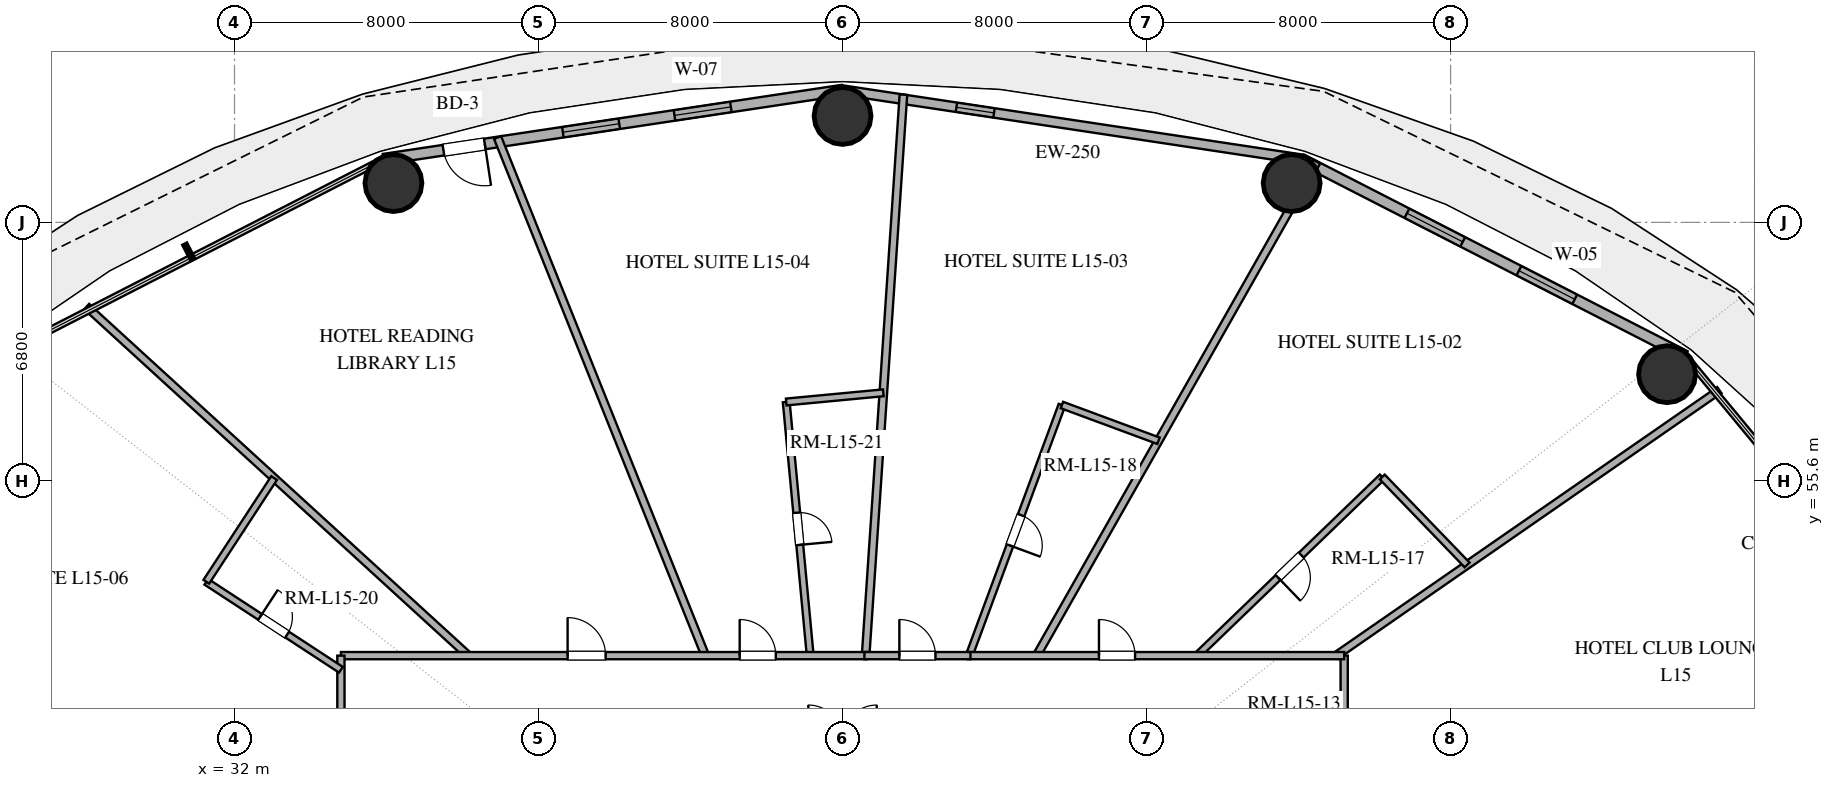
"""IFC4 building model, lengths in metres.
Left out: names, types, materials, properties, quantities, classifications, styles, units other than length and angle.
Written with IfcOpenShell. Run it as: python <this file> out.ifc"""

import sys

from ifc_helpers import new_model, si_unit, direction, frame, frame_2d, origin, origin_2d, place, context, subcontext, project, spatial, rectangle, hollow_circle, extrude, element, fill, save


model = new_model("IFC4")
c1 = context("Model", 3, precision=1e-05, world=origin(), true_north=direction((0.0, 1.0)))
c2 = subcontext(c1, "Body", "Model", "MODEL_VIEW")
j1 = project(units=[si_unit("LENGTHUNIT", "METRE"), si_unit("PLANEANGLEUNIT", "RADIAN")], contexts=[c1])
p1 = place(None, origin())
s1 = spatial("IfcSite", under=j1, at=p1, CompositionType="ELEMENT")
p2 = place(p1, origin())
s2 = spatial("IfcBuilding", under=s1, at=p2, CompositionType="ELEMENT")
p3 = place(p2, frame((0.0, 0.0, 64.2)))
s3 = spatial("IfcBuildingStorey", under=s2, at=p3, CompositionType="ELEMENT", Elevation=64.2)
for number, where, z_axis, x_axis in (
    (1, (69.697, 58.405, 0.0), (0.0, 0.0, 1.0), (1.0, 0.0, 0.0)),
    (2, (59.818, 63.434, 0.0), (0.0, 0.0, 1.0), (1.0, 0.0, 0.0)),
    (3, (48.0, 65.2, 0.0), (0.0, 0.0, 1.0), (1.0, 0.0, 0.0)),
    (4, (36.182, 63.434, 0.0), (0.0, 0.0, 1.0), (1.0, 0.0, 0.0)),
):
    element("IfcColumn", number, at=place(p3, frame(where, z_axis=z_axis, x_axis=x_axis)), inside=s3, PredefinedType="COLUMN", context=c2, shape_type="SweptSolid", body=[
        extrude(hollow_circle(Radius=0.75, WallThickness=0.04, at=origin_2d()), origin(), (0.0, 0.0, 1.0), 3.38),
    ])
p4 = place(p3, frame((70.174, 58.886, 0.0), z_axis=(0.0, 0.0, 1.0), x_axis=(-0.889853976658, 0.456245438581, 0.0)))
e5 = element("IfcWall", 5, at=p4, inside=s3, PredefinedType="SOLIDWALL", context=c2, shape_type="SweptSolid", body=[
    extrude(rectangle(XDim=11.346, YDim=0.28, at=frame_2d((5.673, 0.0))), origin(), (0.0, 0.0, 1.0), 3.38),
])
p5 = place(p4, frame((3.267, 0.0, 0.85)))
e6 = element("IfcOpeningElement", 6, at=p5, cuts=e5, PredefinedType="OPENING", context=c2, shape_type="SweptSolid", body=[
    extrude(rectangle(XDim=1.65, YDim=2.0, at=frame_2d((0.825, 1.0))), frame((0.0, 0.15, 0.0), z_axis=(0.0, -1.0, 0.0), x_axis=(1.0, 0.0, 0.0)), (0.0, 0.0, 1.0), 0.3),
])
p6 = place(p4, frame((6.579, 0.0, 0.85)))
e7 = element("IfcOpeningElement", 7, at=p6, cuts=e5, PredefinedType="OPENING", context=c2, shape_type="SweptSolid", body=[
    extrude(rectangle(XDim=1.65, YDim=2.0, at=frame_2d((0.825, 1.0))), frame((0.0, 0.15, 0.0), z_axis=(0.0, -1.0, 0.0), x_axis=(1.0, 0.0, 0.0)), (0.0, 0.0, 1.0), 0.3),
])
p7 = place(p3, frame((60.078, 64.062, 0.0), z_axis=(0.0, 0.0, 1.0), x_axis=(-0.988864835849, 0.148816452121, 0.0)))
e8 = element("IfcWall", 8, at=p7, inside=s3, PredefinedType="SOLIDWALL", context=c2, shape_type="SweptSolid", body=[
    extrude(rectangle(XDim=12.214, YDim=0.25, at=frame_2d((6.107, 0.0))), origin(), (0.0, 0.0, 1.0), 3.38),
])
p8 = place(p7, frame((8.183, 0.0, 1.42)))
e9 = element("IfcOpeningElement", 9, at=p8, cuts=e8, PredefinedType="OPENING", context=c2, shape_type="SweptSolid", body=[
    extrude(rectangle(XDim=1.0, YDim=1.05, at=frame_2d((0.5, 0.525))), frame((0.0, 0.135, 0.0), z_axis=(0.0, -1.0, 0.0), x_axis=(1.0, 0.0, 0.0)), (0.0, 0.0, 1.0), 0.27),
])
p9 = place(p3, frame((48.0, 65.88, 0.0), z_axis=(0.0, 0.0, 1.0), x_axis=(-0.988864835849, -0.148816452121, 0.0)))
e10 = element("IfcWall", 10, at=p9, inside=s3, PredefinedType="SOLIDWALL", context=c2, shape_type="SweptSolid", body=[
    extrude(rectangle(XDim=12.214, YDim=0.28, at=frame_2d((6.107, 0.0))), origin(), (0.0, 0.0, 1.0), 3.38),
])
p10 = place(p9, frame((2.972, 0.0, 0.85)))
e11 = element("IfcOpeningElement", 11, at=p10, cuts=e10, PredefinedType="OPENING", context=c2, shape_type="SweptSolid", body=[
    extrude(rectangle(XDim=1.5, YDim=1.8, at=frame_2d((0.75, 0.9))), frame((0.0, 0.15, 0.0), z_axis=(0.0, -1.0, 0.0), x_axis=(1.0, 0.0, 0.0)), (0.0, 0.0, 1.0), 0.3),
])
p11 = place(p9, frame((5.942, 0.0, 0.85)))
e12 = element("IfcOpeningElement", 12, at=p11, cuts=e10, PredefinedType="OPENING", context=c2, shape_type="SweptSolid", body=[
    extrude(rectangle(XDim=1.5, YDim=1.8, at=frame_2d((0.75, 0.9))), frame((0.0, 0.15, 0.0), z_axis=(0.0, -1.0, 0.0), x_axis=(1.0, 0.0, 0.0)), (0.0, 0.0, 1.0), 0.3),
])
p12 = place(p9, frame((9.52, 0.0, 0.0)))
e13 = element("IfcOpeningElement", 13, at=p12, cuts=e10, PredefinedType="OPENING", context=c2, shape_type="SweptSolid", body=[
    extrude(rectangle(XDim=1.1, YDim=2.25, at=frame_2d((0.55, 1.125))), frame((0.0, 0.15, 0.0), z_axis=(0.0, -1.0, 0.0), x_axis=(1.0, 0.0, 0.0)), (0.0, 0.0, 1.0), 0.3),
])
p13 = place(p3, frame((44.39, 51.0, 0.0), z_axis=(0.0, 0.0, 1.0), x_axis=(-0.372301847193, 0.928111703717, 0.0)))
e14 = element("IfcWall", 14, at=p13, inside=s3, PredefinedType="PARTITIONING", context=c2, shape_type="SweptSolid", body=[
    extrude(rectangle(XDim=14.688, YDim=0.2, at=frame_2d((7.344, 0.0))), origin(), (0.0, 0.0, 1.0), 2.74),
])
p14 = place(p3, frame((19.184, 50.653, 0.0), z_axis=(0.0, 0.0, 1.0), x_axis=(0.957749889613, -0.287602414708, 0.0)))
e15 = element("IfcWall", 15, at=p14, inside=s3, PredefinedType="PARTITIONING", context=c2, shape_type="SweptSolid", body=[
    extrude(rectangle(XDim=8.8, YDim=0.2, at=frame_2d((4.4, 0.0))), origin(), (0.0, 0.0, 1.0), 2.74),
])
p15 = place(p3, frame((53.107, 51.0, 0.0), z_axis=(0.0, 0.0, 1.0), x_axis=(0.493512300658, 0.869738816599, 0.0)))
e16 = element("IfcWall", 16, at=p15, inside=s3, PredefinedType="PARTITIONING", context=c2, shape_type="SweptSolid", body=[
    extrude(rectangle(XDim=14.938, YDim=0.2, at=frame_2d((7.469, 0.0))), origin(), (0.0, 0.0, 1.0), 2.74),
])
p16 = place(p3, frame((60.991, 51.0, 0.0), z_axis=(0.0, 0.0, 1.0), x_axis=(0.821999402566, 0.569488351226, 0.0)))
e17 = element("IfcWall", 17, at=p16, inside=s3, PredefinedType="PARTITIONING", context=c2, shape_type="SweptSolid", body=[
    extrude(rectangle(XDim=12.266, YDim=0.2, at=frame_2d((6.133, 0.0))), origin(), (0.0, 0.0, 1.0), 2.74),
])
p17 = place(p3, frame((48.607, 51.0, 0.0), z_axis=(0.0, 0.0, 1.0), x_axis=(0.067284649742, 0.997733820169, 0.0)))
e18 = element("IfcWall", 18, at=p17, inside=s3, PredefinedType="PARTITIONING", context=c2, shape_type="SweptSolid", body=[
    extrude(rectangle(XDim=14.793, YDim=0.2, at=frame_2d((7.396, 0.0))), origin(), (0.0, 0.0, 1.0), 2.74),
])
p18 = place(p3, frame((53.773, 57.594, 0.0), z_axis=(0.0, 0.0, 1.0), x_axis=(-0.347170736851, -0.93780194043, 0.0)))
e19 = element("IfcWall", 19, at=p18, inside=s3, PredefinedType="PLUMBINGWALL", context=c2, shape_type="SweptSolid", body=[
    extrude(rectangle(XDim=7.031, YDim=0.18, at=frame_2d((3.516, 0.0))), origin(), (0.0, 0.0, 1.0), 2.74),
])
p19 = place(p18, frame((3.091, 0.0, 0.0)))
e20 = element("IfcOpeningElement", 20, at=p19, cuts=e19, PredefinedType="OPENING", context=c2, shape_type="SweptSolid", body=[
    extrude(rectangle(XDim=0.85, YDim=2.1, at=frame_2d((0.425, 1.05))), frame((0.0, 0.1, 0.0), z_axis=(0.0, -1.0, 0.0), x_axis=(1.0, 0.0, 0.0)), (0.0, 0.0, 1.0), 0.2),
])
p20 = place(p3, frame((38.154, 51.0, 0.0), z_axis=(0.0, 0.0, 1.0), x_axis=(-0.738119160364, 0.674670367738, 0.0)))
e21 = element("IfcWall", 21, at=p20, inside=s3, PredefinedType="PARTITIONING", context=c2, shape_type="SweptSolid", body=[
    extrude(rectangle(XDim=13.61, YDim=0.2, at=frame_2d((6.805, 0.0))), origin(), (0.0, 0.0, 1.0), 2.74),
])
p21 = place(p3, frame((61.2, 51.0, 0.0), z_axis=(0.0, 0.0, 1.0), x_axis=(0.0, -1.0, 0.0)))
e22 = element("IfcWall", 22, at=p21, inside=s3, PredefinedType="PARTITIONING", context=c2, shape_type="SweptSolid", body=[
    extrude(rectangle(XDim=12.964, YDim=0.19, at=frame_2d((6.482, 0.0))), origin(), (0.0, 0.0, 1.0), 2.74),
])
p22 = place(p21, frame((2.971, 0.0, 0.0)))
e23 = element("IfcOpeningElement", 23, at=p22, cuts=e22, PredefinedType="OPENING", context=c2, shape_type="SweptSolid", body=[
    extrude(rectangle(XDim=1.0, YDim=2.2, at=frame_2d((0.5, 1.1))), frame((0.0, 0.105, 0.0), z_axis=(0.0, -1.0, 0.0), x_axis=(1.0, 0.0, 0.0)), (0.0, 0.0, 1.0), 0.21),
])
p23 = place(p21, frame((8.344, 0.0, 0.0)))
e24 = element("IfcOpeningElement", 24, at=p23, cuts=e22, PredefinedType="OPENING", context=c2, shape_type="SweptSolid", body=[
    extrude(rectangle(XDim=0.95, YDim=2.15, at=frame_2d((0.475, 1.075))), frame((0.0, 0.105, 0.0), z_axis=(0.0, -1.0, 0.0), x_axis=(1.0, 0.0, 0.0)), (0.0, 0.0, 1.0), 0.21),
])
p24 = place(p3, frame((62.202, 55.701, 0.0), z_axis=(0.0, 0.0, 1.0), x_axis=(-0.719667322044, -0.69431905172, 0.0)))
e25 = element("IfcWall", 25, at=p24, inside=s3, PredefinedType="PLUMBINGWALL", context=c2, shape_type="SweptSolid", body=[
    extrude(rectangle(XDim=6.771, YDim=0.18, at=frame_2d((3.385, 0.0))), origin(), (0.0, 0.0, 1.0), 2.74),
])
p25 = place(p24, frame((2.96, 0.0, 0.0)))
e26 = element("IfcOpeningElement", 26, at=p25, cuts=e25, PredefinedType="OPENING", context=c2, shape_type="SweptSolid", body=[
    extrude(rectangle(XDim=0.85, YDim=2.1, at=frame_2d((0.425, 1.05))), frame((0.0, 0.1, 0.0), z_axis=(0.0, -1.0, 0.0), x_axis=(1.0, 0.0, 0.0)), (0.0, 0.0, 1.0), 0.2),
])
p26 = place(p3, frame((46.518, 57.674, 0.0), z_axis=(0.0, 0.0, 1.0), x_axis=(0.094107851527, -0.995562008255, 0.0)))
e27 = element("IfcWall", 27, at=p26, inside=s3, PredefinedType="PLUMBINGWALL", context=c2, shape_type="SweptSolid", body=[
    extrude(rectangle(XDim=6.704, YDim=0.18, at=frame_2d((3.352, 0.0))), origin(), (0.0, 0.0, 1.0), 2.74),
])
p27 = place(p26, frame((2.927, 0.0, 0.0)))
e28 = element("IfcOpeningElement", 28, at=p27, cuts=e27, PredefinedType="OPENING", context=c2, shape_type="SweptSolid", body=[
    extrude(rectangle(XDim=0.85, YDim=2.1, at=frame_2d((0.425, 1.05))), frame((0.0, 0.1, 0.0), z_axis=(0.0, -1.0, 0.0), x_axis=(1.0, 0.0, 0.0)), (0.0, 0.0, 1.0), 0.2),
])
p28 = place(p3, frame((34.8, 51.0, 0.0), z_axis=(0.0, 0.0, 1.0), x_axis=(1.0, 0.0, 0.0)))
e29 = element("IfcWall", 29, at=p28, inside=s3, PredefinedType="PARTITIONING", context=c2, shape_type="SweptSolid", body=[
    extrude(rectangle(XDim=13.839, YDim=0.19, at=frame_2d((6.919, 0.0))), origin(), (0.0, 0.0, 1.0), 2.74),
])
p29 = place(p28, frame((5.965, 0.0, 0.0)))
e30 = element("IfcOpeningElement", 30, at=p29, cuts=e29, PredefinedType="OPENING", context=c2, shape_type="SweptSolid", body=[
    extrude(rectangle(XDim=1.0, YDim=2.2, at=frame_2d((0.5, 1.1))), frame((0.0, 0.105, 0.0), z_axis=(0.0, -1.0, 0.0), x_axis=(1.0, 0.0, 0.0)), (0.0, 0.0, 1.0), 0.21),
])
p30 = place(p28, frame((10.493, 0.0, 0.0)))
e31 = element("IfcOpeningElement", 31, at=p30, cuts=e29, PredefinedType="OPENING", context=c2, shape_type="SweptSolid", body=[
    extrude(rectangle(XDim=0.95, YDim=2.15, at=frame_2d((0.475, 1.075))), frame((0.0, 0.105, 0.0), z_axis=(0.0, -1.0, 0.0), x_axis=(1.0, 0.0, 0.0)), (0.0, 0.0, 1.0), 0.21),
])
p31 = place(p3, frame((34.8, 43.728, 0.0), z_axis=(0.0, 0.0, 1.0), x_axis=(0.0, 1.0, 0.0)))
e32 = element("IfcWall", 32, at=p31, inside=s3, PredefinedType="PARTITIONING", context=c2, shape_type="SweptSolid", body=[
    extrude(rectangle(XDim=7.272, YDim=0.19, at=frame_2d((3.636, 0.0))), origin(), (0.0, 0.0, 1.0), 2.74),
])
p32 = place(p31, frame((4.096, 0.0, 0.0)))
e33 = element("IfcOpeningElement", 33, at=p32, cuts=e32, PredefinedType="OPENING", context=c2, shape_type="SweptSolid", body=[
    extrude(rectangle(XDim=0.95, YDim=2.15, at=frame_2d((0.475, 1.075))), frame((0.0, 0.105, 0.0), z_axis=(0.0, -1.0, 0.0), x_axis=(1.0, 0.0, 0.0)), (0.0, 0.0, 1.0), 0.21),
])
p33 = place(p3, frame((51.298, 51.0, 0.0), z_axis=(0.0, 0.0, 1.0), x_axis=(1.0, 0.0, 0.0)))
e34 = element("IfcWall", 34, at=p33, inside=s3, PredefinedType="PARTITIONING", context=c2, shape_type="SweptSolid", body=[
    extrude(rectangle(XDim=9.902, YDim=0.19, at=frame_2d((4.951, 0.0))), origin(), (0.0, 0.0, 1.0), 2.74),
])
p34 = place(p33, frame((3.45, 0.0, 0.0)))
e35 = element("IfcOpeningElement", 35, at=p34, cuts=e34, PredefinedType="OPENING", context=c2, shape_type="SweptSolid", body=[
    extrude(rectangle(XDim=0.95, YDim=2.15, at=frame_2d((0.475, 1.075))), frame((0.0, 0.105, 0.0), z_axis=(0.0, -1.0, 0.0), x_axis=(1.0, 0.0, 0.0)), (0.0, 0.0, 1.0), 0.21),
])
p35 = place(p3, frame((31.258, 52.944, 0.0), z_axis=(0.0, 0.0, 1.0), x_axis=(0.837031612028, -0.5471545307, 0.0)))
e36 = element("IfcWall", 36, at=p35, inside=s3, PredefinedType="PLUMBINGWALL", context=c2, shape_type="SweptSolid", body=[
    extrude(rectangle(XDim=4.231, YDim=0.18, at=frame_2d((2.116, 0.0))), origin(), (0.0, 0.0, 1.0), 2.74),
])
p36 = place(p35, frame((1.691, 0.0, 0.0)))
e37 = element("IfcOpeningElement", 37, at=p36, cuts=e36, PredefinedType="OPENING", context=c2, shape_type="SweptSolid", body=[
    extrude(rectangle(XDim=0.85, YDim=2.1, at=frame_2d((0.425, 1.05))), frame((0.0, 0.1, 0.0), z_axis=(0.0, -1.0, 0.0), x_axis=(1.0, 0.0, 0.0)), (0.0, 0.0, 1.0), 0.2),
])
p37 = place(p3, frame((33.042, 55.672, 0.0), z_axis=(0.0, 0.0, 1.0), x_axis=(-0.547176717469, -0.837017108463, 0.0)))
e38 = element("IfcWall", 38, at=p37, inside=s3, PredefinedType="PLUMBINGWALL", context=c2, shape_type="SweptSolid", body=[
    extrude(rectangle(XDim=3.26, YDim=0.18, at=frame_2d((1.63, 0.0))), origin(), (0.0, 0.0, 1.0), 2.74),
])
p38 = place(p3, frame((64.435, 53.386, 0.0), z_axis=(0.0, 0.0, 1.0), x_axis=(-0.694278833189, 0.719706121821, 0.0)))
e39 = element("IfcWall", 39, at=p38, inside=s3, PredefinedType="PLUMBINGWALL", context=c2, shape_type="SweptSolid", body=[
    extrude(rectangle(XDim=3.217, YDim=0.18, at=frame_2d((1.608, 0.0))), origin(), (0.0, 0.0, 1.0), 2.74),
])
p39 = place(p3, frame((48.575, 51.0, 0.0), z_axis=(0.0, 0.0, 1.0), x_axis=(1.0, 0.0, 0.0)))
e40 = element("IfcWall", 40, at=p39, inside=s3, PredefinedType="PARTITIONING", context=c2, shape_type="SweptSolid", body=[
    extrude(rectangle(XDim=2.791, YDim=0.19, at=frame_2d((1.396, 0.0))), origin(), (0.0, 0.0, 1.0), 2.74),
])
p40 = place(p39, frame((0.921, 0.0, 0.0)))
e41 = element("IfcOpeningElement", 41, at=p40, cuts=e40, PredefinedType="OPENING", context=c2, shape_type="SweptSolid", body=[
    extrude(rectangle(XDim=0.95, YDim=2.15, at=frame_2d((0.475, 1.075))), frame((0.0, 0.105, 0.0), z_axis=(0.0, -1.0, 0.0), x_axis=(1.0, 0.0, 0.0)), (0.0, 0.0, 1.0), 0.21),
])
p41 = place(p3, frame((56.315, 56.653, 0.0), z_axis=(0.0, 0.0, 1.0), x_axis=(-0.937805250992, 0.347161793999, 0.0)))
e42 = element("IfcWall", 42, at=p41, inside=s3, PredefinedType="PLUMBINGWALL", context=c2, shape_type="SweptSolid", body=[
    extrude(rectangle(XDim=2.71, YDim=0.18, at=frame_2d((1.355, 0.0))), origin(), (0.0, 0.0, 1.0), 2.74),
])
p42 = place(p3, frame((49.073, 57.915, 0.0), z_axis=(0.0, 0.0, 1.0), x_axis=(-0.995563205557, -0.09409518447, 0.0)))
e43 = element("IfcWall", 43, at=p42, inside=s3, PredefinedType="PLUMBINGWALL", context=c2, shape_type="SweptSolid", body=[
    extrude(rectangle(XDim=2.566, YDim=0.18, at=frame_2d((1.283, 0.0))), origin(), (0.0, 0.0, 1.0), 2.74),
])
p43 = place(p5, origin())
e44 = element("IfcWindow", 44, at=p43, inside=s3, PartitioningType="SINGLE_PANEL", PredefinedType="WINDOW", context=c2, shape_type="SweptSolid", body=[
    extrude(rectangle(XDim=1.65, YDim=2.0, at=frame_2d((0.825, 1.0))), frame((0.0, 0.03, 0.0), z_axis=(0.0, -1.0, 0.0), x_axis=(1.0, 0.0, 0.0)), (0.0, 0.0, 1.0), 0.06),
])
fill(e6, e44)
p44 = place(p6, origin())
e45 = element("IfcWindow", 45, at=p44, inside=s3, PartitioningType="SINGLE_PANEL", PredefinedType="WINDOW", context=c2, shape_type="SweptSolid", body=[
    extrude(rectangle(XDim=1.65, YDim=2.0, at=frame_2d((0.825, 1.0))), frame((0.0, 0.03, 0.0), z_axis=(0.0, -1.0, 0.0), x_axis=(1.0, 0.0, 0.0)), (0.0, 0.0, 1.0), 0.06),
])
fill(e7, e45)
p45 = place(p10, origin())
e46 = element("IfcWindow", 46, at=p45, inside=s3, PartitioningType="SINGLE_PANEL", PredefinedType="WINDOW", context=c2, shape_type="SweptSolid", body=[
    extrude(rectangle(XDim=1.5, YDim=1.8, at=frame_2d((0.75, 0.9))), frame((0.0, 0.03, 0.0), z_axis=(0.0, -1.0, 0.0), x_axis=(1.0, 0.0, 0.0)), (0.0, 0.0, 1.0), 0.06),
])
fill(e11, e46)
p46 = place(p11, origin())
e47 = element("IfcWindow", 47, at=p46, inside=s3, PartitioningType="SINGLE_PANEL", PredefinedType="WINDOW", context=c2, shape_type="SweptSolid", body=[
    extrude(rectangle(XDim=1.5, YDim=1.8, at=frame_2d((0.75, 0.9))), frame((0.0, 0.03, 0.0), z_axis=(0.0, -1.0, 0.0), x_axis=(1.0, 0.0, 0.0)), (0.0, 0.0, 1.0), 0.06),
])
fill(e12, e47)
p47 = place(p12, origin())
e48 = element("IfcDoor", 48, at=p47, inside=s3, OperationType="SINGLE_SWING_LEFT", PredefinedType="DOOR", context=c2, shape_type="SweptSolid", body=[
    extrude(rectangle(XDim=1.1, YDim=2.25, at=frame_2d((0.55, 1.125))), frame((0.0, 0.025, 0.0), z_axis=(0.0, -1.0, 0.0), x_axis=(1.0, 0.0, 0.0)), (0.0, 0.0, 1.0), 0.05),
])
fill(e13, e48)
p48 = place(p8, origin())
e49 = element("IfcWindow", 49, at=p48, inside=s3, PartitioningType="SINGLE_PANEL", PredefinedType="WINDOW", context=c2, shape_type="SweptSolid", body=[
    extrude(rectangle(XDim=1.0, YDim=1.05, at=frame_2d((0.5, 0.525))), frame((0.0, 0.03, 0.0), z_axis=(0.0, -1.0, 0.0), x_axis=(1.0, 0.0, 0.0)), (0.0, 0.0, 1.0), 0.06),
])
fill(e9, e49)
p49 = place(p19, origin())
e50 = element("IfcDoor", 50, at=p49, inside=s3, OperationType="SINGLE_SWING_RIGHT", PredefinedType="DOOR", context=c2, shape_type="SweptSolid", body=[
    extrude(rectangle(XDim=0.85, YDim=2.1, at=frame_2d((0.425, 1.05))), frame((0.0, 0.025, 0.0), z_axis=(0.0, -1.0, 0.0), x_axis=(1.0, 0.0, 0.0)), (0.0, 0.0, 1.0), 0.05),
])
fill(e20, e50)
p50 = place(p25, origin())
e51 = element("IfcDoor", 51, at=p50, inside=s3, OperationType="SINGLE_SWING_RIGHT", PredefinedType="DOOR", context=c2, shape_type="SweptSolid", body=[
    extrude(rectangle(XDim=0.85, YDim=2.1, at=frame_2d((0.425, 1.05))), frame((0.0, 0.025, 0.0), z_axis=(0.0, -1.0, 0.0), x_axis=(1.0, 0.0, 0.0)), (0.0, 0.0, 1.0), 0.05),
])
fill(e26, e51)
p51 = place(p27, origin())
e52 = element("IfcDoor", 52, at=p51, inside=s3, OperationType="SINGLE_SWING_RIGHT", PredefinedType="DOOR", context=c2, shape_type="SweptSolid", body=[
    extrude(rectangle(XDim=0.85, YDim=2.1, at=frame_2d((0.425, 1.05))), frame((0.0, 0.025, 0.0), z_axis=(0.0, -1.0, 0.0), x_axis=(1.0, 0.0, 0.0)), (0.0, 0.0, 1.0), 0.05),
])
fill(e28, e52)
p52 = place(p29, origin())
e53 = element("IfcDoor", 53, at=p52, inside=s3, OperationType="SINGLE_SWING_LEFT", PredefinedType="DOOR", context=c2, shape_type="SweptSolid", body=[
    extrude(rectangle(XDim=1.0, YDim=2.2, at=frame_2d((0.5, 1.1))), frame((0.0, 0.025, 0.0), z_axis=(0.0, -1.0, 0.0), x_axis=(1.0, 0.0, 0.0)), (0.0, 0.0, 1.0), 0.05),
])
fill(e30, e53)
p53 = place(p30, origin())
e54 = element("IfcDoor", 54, at=p53, inside=s3, OperationType="SINGLE_SWING_LEFT", PredefinedType="DOOR", context=c2, shape_type="SweptSolid", body=[
    extrude(rectangle(XDim=0.95, YDim=2.15, at=frame_2d((0.475, 1.075))), frame((0.0, 0.025, 0.0), z_axis=(0.0, -1.0, 0.0), x_axis=(1.0, 0.0, 0.0)), (0.0, 0.0, 1.0), 0.05),
])
fill(e31, e54)
p54 = place(p34, origin())
e55 = element("IfcDoor", 55, at=p54, inside=s3, OperationType="SINGLE_SWING_LEFT", PredefinedType="DOOR", context=c2, shape_type="SweptSolid", body=[
    extrude(rectangle(XDim=0.95, YDim=2.15, at=frame_2d((0.475, 1.075))), frame((0.0, 0.025, 0.0), z_axis=(0.0, -1.0, 0.0), x_axis=(1.0, 0.0, 0.0)), (0.0, 0.0, 1.0), 0.05),
])
fill(e35, e55)
p55 = place(p36, origin())
e56 = element("IfcDoor", 56, at=p55, inside=s3, OperationType="SINGLE_SWING_LEFT", PredefinedType="DOOR", context=c2, shape_type="SweptSolid", body=[
    extrude(rectangle(XDim=0.85, YDim=2.1, at=frame_2d((0.425, 1.05))), frame((0.0, 0.025, 0.0), z_axis=(0.0, -1.0, 0.0), x_axis=(1.0, 0.0, 0.0)), (0.0, 0.0, 1.0), 0.05),
])
fill(e37, e56)
p56 = place(p40, origin())
e57 = element("IfcDoor", 57, at=p56, inside=s3, OperationType="SINGLE_SWING_LEFT", PredefinedType="DOOR", context=c2, shape_type="SweptSolid", body=[
    extrude(rectangle(XDim=0.95, YDim=2.15, at=frame_2d((0.475, 1.075))), frame((0.0, 0.025, 0.0), z_axis=(0.0, -1.0, 0.0), x_axis=(1.0, 0.0, 0.0)), (0.0, 0.0, 1.0), 0.05),
])
fill(e41, e57)
save(model, sys.argv[1])
